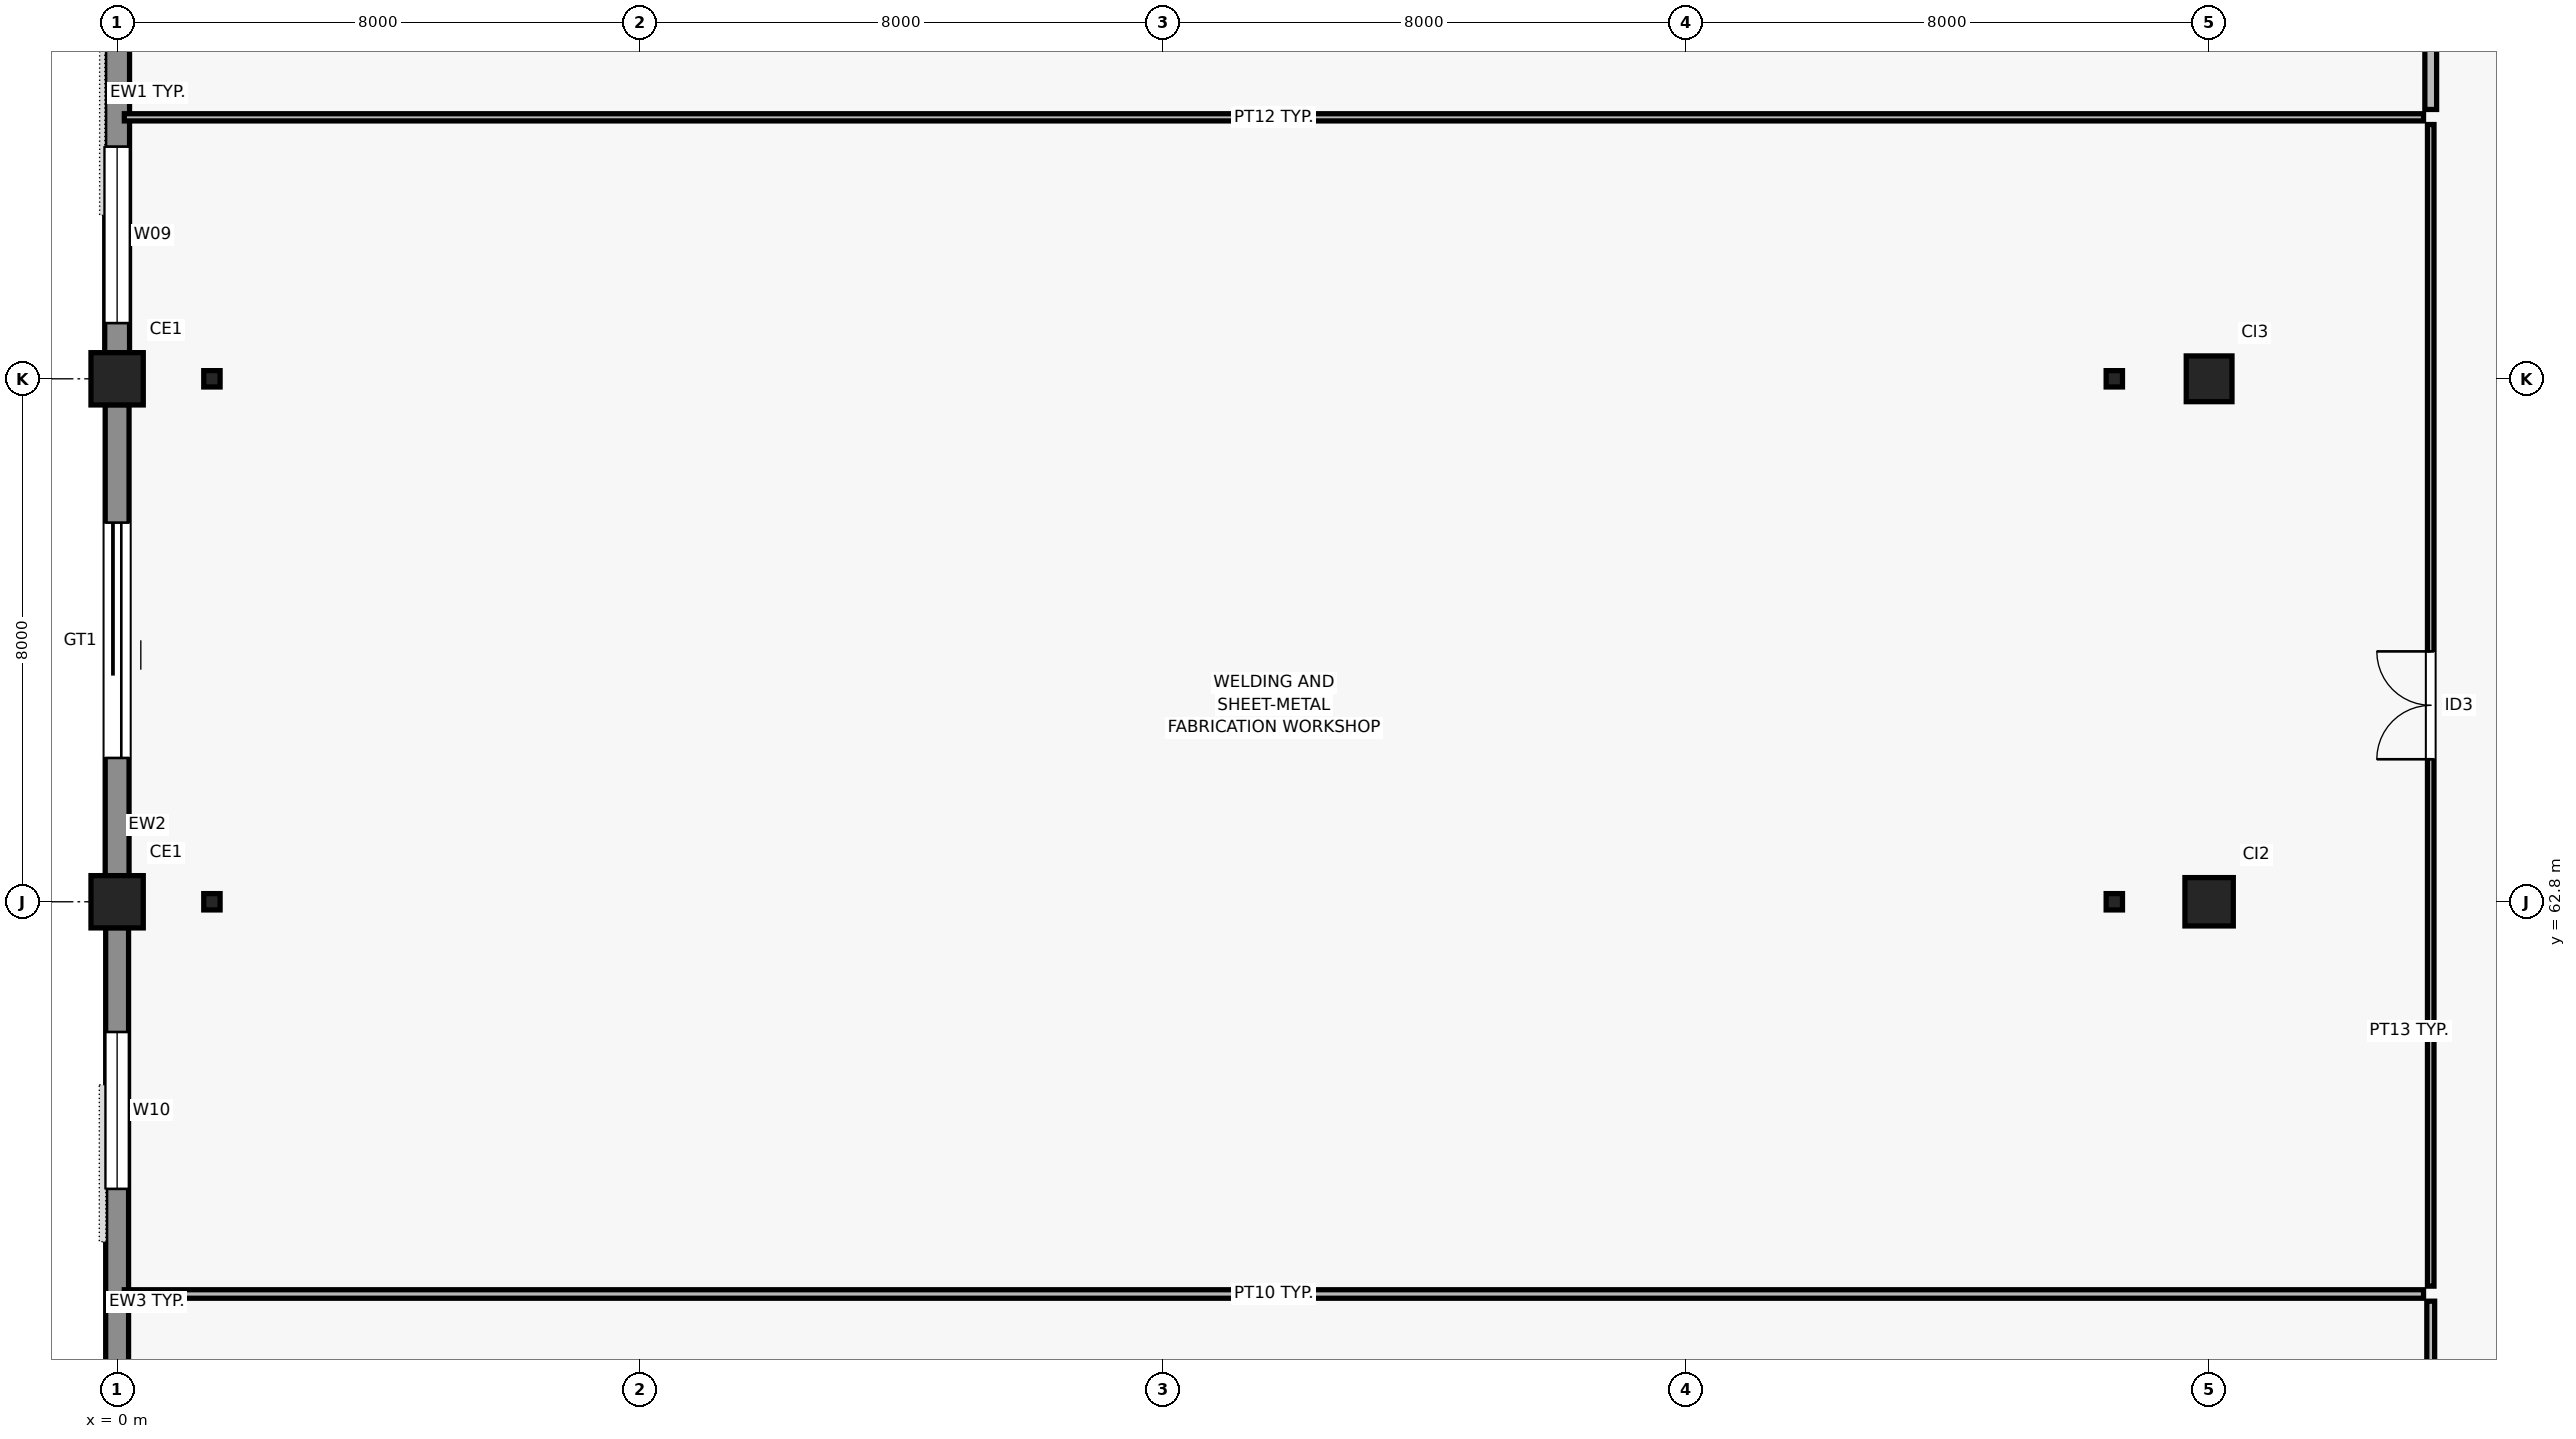
"""IFC4 building model, lengths in metres.
Left out: names, types, materials, properties, quantities, classifications, styles, units other than length and angle.
Written with IfcOpenShell. Run it as: python <this file> out.ifc"""

import sys

from ifc_helpers import new_model, si_unit, direction, frame, frame_2d, origin, origin_2d, place, context, subcontext, project, spatial, rectangle, hollow_rectangle, extrude, element, fill, save


model = new_model("IFC4")
c1 = context("Model", 3, precision=1e-05, world=origin(), true_north=direction((0.0, 1.0)))
c2 = subcontext(c1, "Body", "Model", "MODEL_VIEW")
j1 = project(units=[si_unit("LENGTHUNIT", "METRE"), si_unit("PLANEANGLEUNIT", "RADIAN")], contexts=[c1])
p1 = place(None, origin())
s1 = spatial("IfcSite", under=j1, at=p1, CompositionType="ELEMENT")
p2 = place(p1, origin())
s2 = spatial("IfcBuilding", under=s1, at=p2, CompositionType="ELEMENT")
p3 = place(p2, origin())
s3 = spatial("IfcBuildingStorey", under=s2, at=p3, CompositionType="ELEMENT", Elevation=0.0)
for number, where, z_axis, x_axis in (
    (1, (0.0, 62.8, 0.0), (0.0, 0.0, 1.0), (1.0, 0.0, 0.0)),
    (2, (0.0, 70.8, 0.0), (0.0, 0.0, 1.0), (1.0, 0.0, 0.0)),
):
    element("IfcColumn", number, at=place(p3, frame(where, z_axis=z_axis, x_axis=x_axis)), inside=s3, PredefinedType="COLUMN", context=c2, shape_type="SweptSolid", body=[
        extrude(rectangle(XDim=0.8, YDim=0.8, at=origin_2d()), origin(), (0.0, 0.0, 1.0), 4.5),
    ])
p4 = place(p3, frame((32.0, 62.8, 0.0), z_axis=(0.0, 0.0, 1.0), x_axis=(1.0, 0.0, 0.0)))
e3 = element("IfcColumn", 3, at=p4, inside=s3, PredefinedType="COLUMN", context=c2, shape_type="SweptSolid", body=[
    extrude(rectangle(XDim=0.74, YDim=0.74, at=origin_2d()), origin(), (0.0, 0.0, 1.0), 4.5),
])
p5 = place(p3, frame((32.0, 70.8, 0.0), z_axis=(0.0, 0.0, 1.0), x_axis=(1.0, 0.0, 0.0)))
e4 = element("IfcColumn", 4, at=p5, inside=s3, PredefinedType="COLUMN", context=c2, shape_type="SweptSolid", body=[
    extrude(rectangle(XDim=0.7, YDim=0.7, at=origin_2d()), origin(), (0.0, 0.0, 1.0), 4.5),
])
for number, where, z_axis, x_axis in (
    (5, (1.45, 62.8, 0.0), (0.0, 0.0, 1.0), (1.0, 0.0, 0.0)),
    (6, (1.45, 70.8, 0.0), (0.0, 0.0, 1.0), (1.0, 0.0, 0.0)),
    (7, (30.55, 62.8, 0.0), (0.0, 0.0, 1.0), (1.0, 0.0, 0.0)),
    (8, (30.55, 70.8, 0.0), (0.0, 0.0, 1.0), (1.0, 0.0, 0.0)),
):
    element("IfcColumn", number, at=place(p3, frame(where, z_axis=z_axis, x_axis=x_axis)), inside=s3, PredefinedType="COLUMN", context=c2, shape_type="SweptSolid", body=[
        extrude(hollow_rectangle(XDim=0.25, YDim=0.25, WallThickness=0.01, at=origin_2d()), origin(), (0.0, 0.0, 1.0), 4.5),
    ])
p6 = place(p3, frame((0.0, 78.405, 0.0), z_axis=(0.0, 0.0, 1.0), x_axis=(0.0, -1.0, 0.0)))
e9 = element("IfcWall", 9, at=p6, inside=s3, PredefinedType="SOLIDWALL", context=c2, shape_type="SweptSolid", body=[
    extrude(rectangle(XDim=7.21, YDim=0.38, at=frame_2d((3.605, 0.0))), origin(), (0.0, 0.0, 1.0), 4.22),
])
p7 = place(p6, frame((1.198, 0.0, 0.9)))
e10 = element("IfcOpeningElement", 10, at=p7, cuts=e9, PredefinedType="OPENING", context=c2, shape_type="SweptSolid", body=[
    extrude(rectangle(XDim=1.2, YDim=1.8, at=frame_2d((0.6, 0.9))), frame((0.0, 0.2, 0.0), z_axis=(0.0, -1.0, 0.0), x_axis=(1.0, 0.0, 0.0)), (0.0, 0.0, 1.0), 0.4),
])
p8 = place(p6, frame((4.053, 0.0, 0.9)))
e11 = element("IfcOpeningElement", 11, at=p8, cuts=e9, PredefinedType="OPENING", context=c2, shape_type="SweptSolid", body=[
    extrude(rectangle(XDim=2.7, YDim=1.5, at=frame_2d((1.35, 0.75))), frame((0.0, 0.2, 0.0), z_axis=(0.0, -1.0, 0.0), x_axis=(1.0, 0.0, 0.0)), (0.0, 0.0, 1.0), 0.4),
])
p9 = place(p3, frame((0.0, 70.405, 0.0), z_axis=(0.0, 0.0, 1.0), x_axis=(0.0, -1.0, 0.0)))
e12 = element("IfcWall", 12, at=p9, inside=s3, PredefinedType="SOLIDWALL", context=c2, shape_type="SweptSolid", body=[
    extrude(rectangle(XDim=7.21, YDim=0.365, at=frame_2d((3.605, 0.0))), origin(), (0.0, 0.0, 1.0), 4.22),
])
p10 = place(p9, frame((1.805, 0.0, 0.0)))
e13 = element("IfcOpeningElement", 13, at=p10, cuts=e12, PredefinedType="OPENING", context=c2, shape_type="SweptSolid", body=[
    extrude(rectangle(XDim=3.6, YDim=3.4, at=frame_2d((1.8, 1.7))), frame((0.0, 0.192, 0.0), z_axis=(0.0, -1.0, 0.0), x_axis=(1.0, 0.0, 0.0)), (0.0, 0.0, 1.0), 0.385),
])
p11 = place(p3, frame((0.0, 62.405, 0.0), z_axis=(0.0, 0.0, 1.0), x_axis=(0.0, -1.0, 0.0)))
e14 = element("IfcWall", 14, at=p11, inside=s3, PredefinedType="SOLIDWALL", context=c2, shape_type="SweptSolid", body=[
    extrude(rectangle(XDim=7.21, YDim=0.35, at=frame_2d((3.605, 0.0))), origin(), (0.0, 0.0, 1.0), 4.22),
])
p12 = place(p11, frame((1.597, 0.0, 0.9)))
e15 = element("IfcOpeningElement", 15, at=p12, cuts=e14, PredefinedType="OPENING", context=c2, shape_type="SweptSolid", body=[
    extrude(rectangle(XDim=2.4, YDim=1.5, at=frame_2d((1.2, 0.75))), frame((0.0, 0.185, 0.0), z_axis=(0.0, -1.0, 0.0), x_axis=(1.0, 0.0, 0.0)), (0.0, 0.0, 1.0), 0.37),
])
p13 = place(p3, frame((0.11, 56.8, 0.0), z_axis=(0.0, 0.0, 1.0), x_axis=(1.0, 0.0, 0.0)))
e16 = element("IfcWall", 16, at=p13, inside=s3, PredefinedType="PARTITIONING", context=c2, shape_type="SweptSolid", body=[
    extrude(rectangle(XDim=35.17, YDim=0.13, at=frame_2d((17.585, 0.0))), origin(), (0.0, 0.0, 1.0), 4.2),
])
p14 = place(p3, frame((35.39, 38.91, 0.0), z_axis=(0.0, 0.0, 1.0), x_axis=(0.0, 1.0, 0.0)))
e17 = element("IfcWall", 17, at=p14, inside=s3, PredefinedType="PARTITIONING", context=c2, shape_type="SweptSolid", body=[
    extrude(rectangle(XDim=17.78, YDim=0.12, at=frame_2d((8.89, 0.0))), origin(), (0.0, 0.0, 1.0), 4.2),
])
p15 = place(p14, frame((8.09, 0.0, 0.0)))
e18 = element("IfcOpeningElement", 18, at=p15, cuts=e17, PredefinedType="OPENING", context=c2, shape_type="SweptSolid", body=[
    extrude(rectangle(XDim=1.6, YDim=2.25, at=frame_2d((0.8, 1.125))), frame((0.0, 0.07, 0.0), z_axis=(0.0, -1.0, 0.0), x_axis=(1.0, 0.0, 0.0)), (0.0, 0.0, 1.0), 0.14),
])
p16 = place(p3, frame((0.11, 74.8, 0.0), z_axis=(0.0, 0.0, 1.0), x_axis=(1.0, 0.0, 0.0)))
e19 = element("IfcWall", 19, at=p16, inside=s3, PredefinedType="PARTITIONING", context=c2, shape_type="SweptSolid", body=[
    extrude(rectangle(XDim=35.17, YDim=0.11, at=frame_2d((17.585, 0.0))), origin(), (0.0, 0.0, 1.0), 4.2),
])
p17 = place(p3, frame((35.39, 56.92, 0.0), z_axis=(0.0, 0.0, 1.0), x_axis=(0.0, 1.0, 0.0)))
e20 = element("IfcWall", 20, at=p17, inside=s3, PredefinedType="PARTITIONING", context=c2, shape_type="SweptSolid", body=[
    extrude(rectangle(XDim=17.77, YDim=0.1, at=frame_2d((8.885, 0.0))), origin(), (0.0, 0.0, 1.0), 4.2),
])
p18 = place(p17, frame((8.06, 0.0, 0.0)))
e21 = element("IfcOpeningElement", 21, at=p18, cuts=e20, PredefinedType="OPENING", context=c2, shape_type="SweptSolid", body=[
    extrude(rectangle(XDim=1.65, YDim=2.3, at=frame_2d((0.825, 1.15))), frame((0.0, 0.06, 0.0), z_axis=(0.0, -1.0, 0.0), x_axis=(1.0, 0.0, 0.0)), (0.0, 0.0, 1.0), 0.12),
])
p19 = place(p3, frame((35.39, 74.92, 0.0), z_axis=(0.0, 0.0, 1.0), x_axis=(0.0, 1.0, 0.0)))
e22 = element("IfcWall", 22, at=p19, inside=s3, PredefinedType="PARTITIONING", context=c2, shape_type="SweptSolid", body=[
    extrude(rectangle(XDim=18.17, YDim=0.18, at=frame_2d((9.085, 0.0))), origin(), (0.0, 0.0, 1.0), 4.2),
])
p20 = place(p19, frame((8.285, 0.0, 0.0)))
e23 = element("IfcOpeningElement", 23, at=p20, cuts=e22, PredefinedType="OPENING", context=c2, shape_type="SweptSolid", body=[
    extrude(rectangle(XDim=1.6, YDim=2.25, at=frame_2d((0.8, 1.125))), frame((0.0, 0.1, 0.0), z_axis=(0.0, -1.0, 0.0), x_axis=(1.0, 0.0, 0.0)), (0.0, 0.0, 1.0), 0.2),
])
p21 = place(p8, origin())
e24 = element("IfcWindow", 24, at=p21, inside=s3, PartitioningType="SINGLE_PANEL", PredefinedType="WINDOW", context=c2, shape_type="SweptSolid", body=[
    extrude(rectangle(XDim=2.7, YDim=1.5, at=frame_2d((1.35, 0.75))), frame((0.0, 0.03, 0.0), z_axis=(0.0, -1.0, 0.0), x_axis=(1.0, 0.0, 0.0)), (0.0, 0.0, 1.0), 0.06),
])
fill(e11, e24)
p22 = place(p10, frame((3.6, 0.0, 0.0), z_axis=(0.0, 0.0, 1.0), x_axis=(-1.0, 0.0, 0.0)))
e25 = element("IfcDoor", 25, at=p22, inside=s3, OperationType="ROLLINGUP", PredefinedType="GATE", context=c2, shape_type="SweptSolid", body=[
    extrude(rectangle(XDim=3.6, YDim=3.4, at=frame_2d((1.8, 1.7))), frame((0.0, 0.025, 0.0), z_axis=(0.0, -1.0, 0.0), x_axis=(1.0, 0.0, 0.0)), (0.0, 0.0, 1.0), 0.05),
])
fill(e13, e25)
p23 = place(p12, origin())
e26 = element("IfcWindow", 26, at=p23, inside=s3, PartitioningType="SINGLE_PANEL", PredefinedType="WINDOW", context=c2, shape_type="SweptSolid", body=[
    extrude(rectangle(XDim=2.4, YDim=1.5, at=frame_2d((1.2, 0.75))), frame((0.0, 0.03, 0.0), z_axis=(0.0, -1.0, 0.0), x_axis=(1.0, 0.0, 0.0)), (0.0, 0.0, 1.0), 0.06),
])
fill(e15, e26)
p24 = place(p18, origin())
e27 = element("IfcDoor", 27, at=p24, inside=s3, OperationType="DOUBLE_DOOR_SINGLE_SWING", PredefinedType="DOOR", context=c2, shape_type="SweptSolid", body=[
    extrude(rectangle(XDim=1.65, YDim=2.3, at=frame_2d((0.825, 1.15))), frame((0.0, 0.025, 0.0), z_axis=(0.0, -1.0, 0.0), x_axis=(1.0, 0.0, 0.0)), (0.0, 0.0, 1.0), 0.05),
])
fill(e21, e27)
save(model, sys.argv[1])
